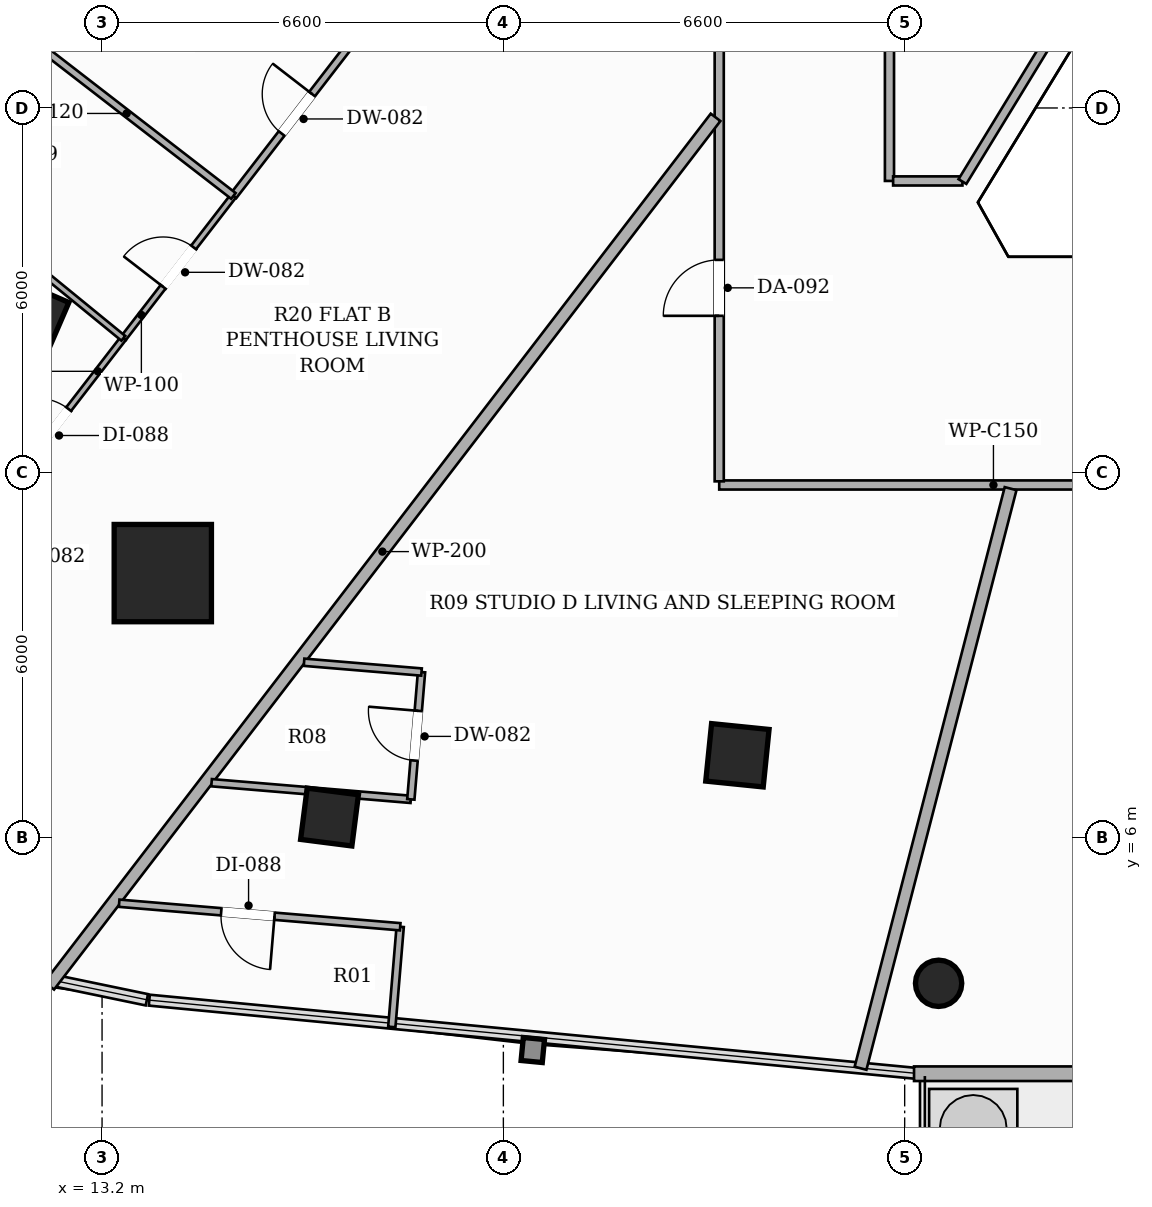
"""IFC4 building model, lengths in metres.
Left out: names, types, materials, properties, quantities, classifications, styles, units other than length and angle.
Written with IfcOpenShell. Run it as: python <this file> out.ifc"""

import sys

from ifc_helpers import new_model, si_unit, direction, frame, frame_2d, origin, origin_2d, place, context, subcontext, project, spatial, rectangle, hollow_rectangle, hollow_circle, extrude, element, fill, save


model = new_model("IFC4")
c1 = context("Model", 3, precision=1e-05, world=origin(), true_north=direction((0.0, 1.0)))
c2 = subcontext(c1, "Body", "Model", "MODEL_VIEW")
j1 = project(units=[si_unit("LENGTHUNIT", "METRE"), si_unit("PLANEANGLEUNIT", "RADIAN")], contexts=[c1])
p1 = place(None, origin())
s1 = spatial("IfcSite", under=j1, at=p1, CompositionType="ELEMENT")
p2 = place(p1, origin())
s2 = spatial("IfcBuilding", under=s1, at=p2, CompositionType="ELEMENT")
p3 = place(p2, frame((0.0, 0.0, 74.15)))
s3 = spatial("IfcBuildingStorey", under=s2, at=p3, CompositionType="ELEMENT", Elevation=74.15)
p4 = place(p3, frame((14.199, 10.351, 0.0), z_axis=(0.0, 0.0, 1.0), x_axis=(1.0, 0.0, 0.0)))
e1 = element("IfcColumn", 1, at=p4, inside=s3, PredefinedType="COLUMN", context=c2, shape_type="SweptSolid", body=[
    extrude(hollow_rectangle(XDim=1.6, YDim=1.6, WallThickness=0.05, at=origin_2d()), origin(), (0.0, 0.0, 1.0), 3.3),
])
p5 = place(p3, frame((23.649, 7.355, 0.0), z_axis=(0.0, 0.0, 1.0), x_axis=(-0.994880708829, 0.101056297183, 0.0)))
e2 = element("IfcColumn", 2, at=p5, inside=s3, PredefinedType="COLUMN", context=c2, shape_type="SweptSolid", body=[
    extrude(hollow_rectangle(XDim=0.95, YDim=0.95, WallThickness=0.032, at=origin_2d()), origin(), (0.0, 0.0, 1.0), 3.3),
])
for number, where, z_axis, x_axis in (
    (3, (12.095, 14.58, 0.0), (0.0, 0.0, 1.0), (0.397, 0.918, 0.0)),
    (4, (16.941, 6.339, 0.0), (0.0, 0.0, 1.0), (-0.992, 0.127, 0.0)),
):
    element("IfcColumn", number, at=place(p3, frame(where, z_axis=z_axis, x_axis=x_axis)), inside=s3, PredefinedType="COLUMN", context=c2, shape_type="SweptSolid", body=[
        extrude(hollow_rectangle(XDim=0.85, YDim=0.85, WallThickness=0.028, at=origin_2d()), origin(), (0.0, 0.0, 1.0), 3.3),
    ])
p6 = place(p3, frame((26.958, 3.605, 0.0), z_axis=(0.0, 0.0, 1.0), x_axis=(1.0, 0.0, 0.0)))
e5 = element("IfcColumn", 5, at=p6, inside=s3, PredefinedType="COLUMN", context=c2, shape_type="SweptSolid", body=[
    extrude(hollow_circle(Radius=0.381, WallThickness=0.022, at=origin_2d()), origin(), (0.0, 0.0, 1.0), 3.3),
])
p7 = place(p3, frame((26.554, 2.118, 0.0), z_axis=(0.0, 0.0, 1.0), x_axis=(1.0, 0.0, 0.0)))
e6 = element("IfcWall", 6, at=p7, inside=s3, PredefinedType="SOLIDWALL", context=c2, shape_type="SweptSolid", body=[
    extrude(rectangle(XDim=12.891, YDim=0.24, at=frame_2d((6.446, 0.0))), origin(), (0.0, 0.0, 1.0), 2.624),
])
p8 = place(p7, frame((10.393, 0.0, 0.0)))
e7 = element("IfcOpeningElement", 7, at=p8, cuts=e6, PredefinedType="OPENING", context=c2, shape_type="SweptSolid", body=[
    extrude(rectangle(XDim=1.8, YDim=2.2, at=frame_2d((0.9, 1.1))), frame((0.0, 0.13, 0.0), z_axis=(0.0, -1.0, 0.0), x_axis=(1.0, 0.0, 0.0)), (0.0, 0.0, 1.0), 0.26),
])
p9 = place(p3, frame((42.59, 11.8, 0.0), z_axis=(0.0, 0.0, 1.0), x_axis=(-1.0, 0.0, 0.0)))
e8 = element("IfcWall", 8, at=p9, inside=s3, PredefinedType="PARTITIONING", context=c2, shape_type="SweptSolid", body=[
    extrude(rectangle(XDim=19.24, YDim=0.15, at=frame_2d((9.62, 0.0))), origin(), (0.0, 0.0, 1.0), 2.669),
])
p10 = place(p9, frame((9.24, 0.0, 0.0)))
e9 = element("IfcOpeningElement", 9, at=p10, cuts=e8, PredefinedType="OPENING", context=c2, shape_type="SweptSolid", body=[
    extrude(rectangle(XDim=0.88, YDim=2.1, at=frame_2d((0.44, 1.05))), frame((0.0, 0.085, 0.0), z_axis=(0.0, -1.0, 0.0), x_axis=(1.0, 0.0, 0.0)), (0.0, 0.0, 1.0), 0.17),
])
p11 = place(p9, frame((2.174, 0.0, 0.0)))
e10 = element("IfcOpeningElement", 10, at=p11, cuts=e8, PredefinedType="OPENING", context=c2, shape_type="SweptSolid", body=[
    extrude(rectangle(XDim=0.88, YDim=2.1, at=frame_2d((0.44, 1.05))), frame((0.0, 0.085, 0.0), z_axis=(0.0, -1.0, 0.0), x_axis=(1.0, 0.0, 0.0)), (0.0, 0.0, 1.0), 0.17),
])
p12 = place(p3, frame((23.35, 11.86, 0.0), z_axis=(0.0, 0.0, 1.0), x_axis=(0.0, 1.0, 0.0)))
e11 = element("IfcWall", 11, at=p12, inside=s3, PredefinedType="PARTITIONING", context=c2, shape_type="SweptSolid", body=[
    extrude(rectangle(XDim=25.04, YDim=0.15, at=frame_2d((12.52, 0.0))), origin(), (0.0, 0.0, 1.0), 2.413),
])
p13 = place(p12, frame((18.695, 0.0, 0.0)))
e12 = element("IfcOpeningElement", 12, at=p13, cuts=e11, PredefinedType="OPENING", context=c2, shape_type="SweptSolid", body=[
    extrude(rectangle(XDim=0.88, YDim=2.1, at=frame_2d((0.44, 1.05))), frame((0.0, 0.085, 0.0), z_axis=(0.0, -1.0, 0.0), x_axis=(1.0, 0.0, 0.0)), (0.0, 0.0, 1.0), 0.17),
])
p14 = place(p12, frame((9.28, 0.0, 0.0)))
e13 = element("IfcOpeningElement", 13, at=p14, cuts=e11, PredefinedType="OPENING", context=c2, shape_type="SweptSolid", body=[
    extrude(rectangle(XDim=0.92, YDim=2.15, at=frame_2d((0.46, 1.075))), frame((0.0, 0.085, 0.0), z_axis=(0.0, -1.0, 0.0), x_axis=(1.0, 0.0, 0.0)), (0.0, 0.0, 1.0), 0.17),
])
p15 = place(p12, frame((2.722, 0.0, 0.0)))
e14 = element("IfcOpeningElement", 14, at=p15, cuts=e11, PredefinedType="OPENING", context=c2, shape_type="SweptSolid", body=[
    extrude(rectangle(XDim=0.92, YDim=2.15, at=frame_2d((0.46, 1.075))), frame((0.0, 0.085, 0.0), z_axis=(0.0, -1.0, 0.0), x_axis=(1.0, 0.0, 0.0)), (0.0, 0.0, 1.0), 0.17),
])
p16 = place(p3, frame((26.15, 23.79, 0.0), z_axis=(0.0, 0.0, 1.0), x_axis=(0.0, -1.0, 0.0)))
e15 = element("IfcWall", 15, at=p16, inside=s3, PredefinedType="PARTITIONING", context=c2, shape_type="SweptSolid", body=[
    extrude(rectangle(XDim=6.99, YDim=0.15, at=frame_2d((3.495, 0.0))), origin(), (0.0, 0.0, 1.0), 2.669),
])
p17 = place(p16, frame((3.943, 0.0, 0.0)))
e16 = element("IfcOpeningElement", 16, at=p17, cuts=e15, PredefinedType="OPENING", context=c2, shape_type="SweptSolid", body=[
    extrude(rectangle(XDim=0.88, YDim=2.1, at=frame_2d((0.44, 1.05))), frame((0.0, 0.085, 0.0), z_axis=(0.0, -1.0, 0.0), x_axis=(1.0, 0.0, 0.0)), (0.0, 0.0, 1.0), 0.17),
])
p18 = place(p3, frame((26.21, 16.8, 0.0), z_axis=(0.0, 0.0, 1.0), x_axis=(1.0, 0.0, 0.0)))
e17 = element("IfcWall", 17, at=p18, inside=s3, PredefinedType="PARTITIONING", context=c2, shape_type="SweptSolid", body=[
    extrude(rectangle(XDim=1.14, YDim=0.15, at=frame_2d((0.57, 0.0))), origin(), (0.0, 0.0, 1.0), 3.06),
])
p19 = place(p3, frame((27.35, 16.79, 0.0), z_axis=(0.0, 0.0, 1.0), x_axis=(0.521108010454, 0.853490738931, 0.0)))
e18 = element("IfcWall", 18, at=p19, inside=s3, PredefinedType="PARTITIONING", context=c2, shape_type="SweptSolid", body=[
    extrude(rectangle(XDim=8.202, YDim=0.15, at=frame_2d((4.101, 0.0))), origin(), (0.0, 0.0, 1.0), 2.669),
])
p20 = place(p3, frame((23.29, 25.387, 0.0), z_axis=(0.0, 0.0, 1.0), x_axis=(-0.884824599801, -0.465924272373, 0.0)))
e19 = element("IfcWall", 19, at=p20, inside=s3, PredefinedType="PARTITIONING", context=c2, shape_type="SweptSolid", body=[
    extrude(rectangle(XDim=14.88, YDim=0.2, at=frame_2d((7.44, 0.0))), origin(), (0.0, 0.0, 1.0), 2.413),
])
p21 = place(p3, frame((23.29, 17.846, 0.0), z_axis=(0.0, 0.0, 1.0), x_axis=(-0.608736412859, -0.793372535232, 0.0)))
e20 = element("IfcWall", 20, at=p21, inside=s3, PredefinedType="PARTITIONING", context=c2, shape_type="SweptSolid", body=[
    extrude(rectangle(XDim=18.003, YDim=0.2, at=frame_2d((9.001, 0.0))), origin(), (0.0, 0.0, 1.0), 2.413),
])
p22 = place(p3, frame((28.142, 11.74, 0.0), z_axis=(0.0, 0.0, 1.0), x_axis=(-0.250654087156, -0.968076716274, 0.0)))
e21 = element("IfcWall", 21, at=p22, inside=s3, PredefinedType="PARTITIONING", context=c2, shape_type="SweptSolid", body=[
    extrude(rectangle(XDim=9.846, YDim=0.2, at=frame_2d((4.923, 0.0))), origin(), (0.0, 0.0, 1.0), 2.413),
])
p23 = place(p3, frame((15.36, 16.554, 0.0), z_axis=(0.0, 0.0, 1.0), x_axis=(0.611289599194, 0.791406991324, 0.0)))
e22 = element("IfcWall", 22, at=p23, inside=s3, PredefinedType="PARTITIONING", context=c2, shape_type="SweptSolid", body=[
    extrude(rectangle(XDim=5.369, YDim=0.12, at=frame_2d((2.685, 0.0))), origin(), (0.0, 0.0, 1.0), 2.669),
])
p24 = place(p23, frame((1.297, 0.0, 0.0)))
e23 = element("IfcOpeningElement", 23, at=p24, cuts=e22, PredefinedType="OPENING", context=c2, shape_type="SweptSolid", body=[
    extrude(rectangle(XDim=0.82, YDim=2.1, at=frame_2d((0.41, 1.05))), frame((0.0, 0.07, 0.0), z_axis=(0.0, -1.0, 0.0), x_axis=(1.0, 0.0, 0.0)), (0.0, 0.0, 1.0), 0.14),
])
p25 = place(p3, frame((11.741, 11.87, 0.0), z_axis=(0.0, 0.0, 1.0), x_axis=(0.61134418085, 0.791364828976, 0.0)))
e24 = element("IfcWall", 24, at=p25, inside=s3, PredefinedType="PARTITIONING", context=c2, shape_type="SweptSolid", body=[
    extrude(rectangle(XDim=2.959, YDim=0.1, at=frame_2d((1.479, 0.0))), origin(), (0.0, 0.0, 1.0), 2.413),
])
p26 = place(p25, frame((0.608, 0.0, 0.0)))
e25 = element("IfcOpeningElement", 25, at=p26, cuts=e24, PredefinedType="OPENING", context=c2, shape_type="SweptSolid", body=[
    extrude(rectangle(XDim=0.88, YDim=2.1, at=frame_2d((0.44, 1.05))), frame((0.0, 0.06, 0.0), z_axis=(0.0, -1.0, 0.0), x_axis=(1.0, 0.0, 0.0)), (0.0, 0.0, 1.0), 0.12),
])
p27 = place(p3, frame((13.55, 14.212, 0.0), z_axis=(0.0, 0.0, 1.0), x_axis=(0.611510880037, 0.791236022686, 0.0)))
e26 = element("IfcWall", 26, at=p27, inside=s3, PredefinedType="PARTITIONING", context=c2, shape_type="SweptSolid", body=[
    extrude(rectangle(XDim=2.96, YDim=0.1, at=frame_2d((1.48, 0.0))), origin(), (0.0, 0.0, 1.0), 3.06),
])
p28 = place(p27, frame((1.07, 0.0, 0.0)))
e27 = element("IfcOpeningElement", 27, at=p28, cuts=e26, PredefinedType="OPENING", context=c2, shape_type="SweptSolid", body=[
    extrude(rectangle(XDim=0.82, YDim=2.1, at=frame_2d((0.41, 1.05))), frame((0.0, 0.06, 0.0), z_axis=(0.0, -1.0, 0.0), x_axis=(1.0, 0.0, 0.0)), (0.0, 0.0, 1.0), 0.12),
])
p29 = place(p3, frame((15.36, 16.554, 0.0), z_axis=(0.0, 0.0, 1.0), x_axis=(-0.79138059941, 0.611323766, 0.0)))
e28 = element("IfcWall", 28, at=p29, inside=s3, PredefinedType="PARTITIONING", context=c2, shape_type="SweptSolid", body=[
    extrude(rectangle(XDim=4.437, YDim=0.12, at=frame_2d((2.218, 0.0))), origin(), (0.0, 0.0, 1.0), 2.413),
])
p30 = place(p3, frame((9.654, 17.394, 0.0), z_axis=(0.0, 0.0, 1.0), x_axis=(0.774493289837, -0.63258212431, 0.0)))
e29 = element("IfcWall", 29, at=p30, inside=s3, PredefinedType="PARTITIONING", context=c2, shape_type="SweptSolid", body=[
    extrude(rectangle(XDim=5.03, YDim=0.1, at=frame_2d((2.515, 0.0))), origin(), (0.0, 0.0, 1.0), 2.413),
])
p31 = place(p3, frame((15.001, 6.904, 0.0), z_axis=(0.0, 0.0, 1.0), x_axis=(0.996518569178, -0.083371105803, 0.0)))
e30 = element("IfcWall", 30, at=p31, inside=s3, PredefinedType="PARTITIONING", context=c2, shape_type="SweptSolid", body=[
    extrude(rectangle(XDim=3.289, YDim=0.12, at=frame_2d((1.644, 0.0))), origin(), (0.0, 0.0, 1.0), 2.413),
])
p32 = place(p3, frame((18.278, 6.63, 0.0), z_axis=(0.0, 0.0, 1.0), x_axis=(0.083756885487, 0.996486218737, 0.0)))
e31 = element("IfcWall", 31, at=p32, inside=s3, PredefinedType="PARTITIONING", context=c2, shape_type="SweptSolid", body=[
    extrude(rectangle(XDim=2.102, YDim=0.12, at=frame_2d((1.051, 0.0))), origin(), (0.0, 0.0, 1.0), 2.413),
])
p33 = place(p32, frame((0.641, 0.0, 0.0)))
e32 = element("IfcOpeningElement", 32, at=p33, cuts=e31, PredefinedType="OPENING", context=c2, shape_type="SweptSolid", body=[
    extrude(rectangle(XDim=0.82, YDim=2.1, at=frame_2d((0.41, 1.05))), frame((0.0, 0.07, 0.0), z_axis=(0.0, -1.0, 0.0), x_axis=(1.0, 0.0, 0.0)), (0.0, 0.0, 1.0), 0.14),
])
p34 = place(p3, frame((18.454, 8.724, 0.0), z_axis=(0.0, 0.0, 1.0), x_axis=(-0.996550966871, 0.082982952637, 0.0)))
e33 = element("IfcWall", 33, at=p34, inside=s3, PredefinedType="PARTITIONING", context=c2, shape_type="SweptSolid", body=[
    extrude(rectangle(XDim=1.939, YDim=0.12, at=frame_2d((0.969, 0.0))), origin(), (0.0, 0.0, 1.0), 2.669),
])
p35 = place(p3, frame((17.965, 2.887, 0.0), z_axis=(0.0, 0.0, 1.0), x_axis=(0.083412008543, 0.996515146313, 0.0)))
e34 = element("IfcWall", 34, at=p35, inside=s3, PredefinedType="PARTITIONING", context=c2, shape_type="SweptSolid", body=[
    extrude(rectangle(XDim=1.654, YDim=0.12, at=frame_2d((0.827, 0.0))), origin(), (0.0, 0.0, 1.0), 2.619),
])
p36 = place(p3, frame((18.103, 4.535, 0.0), z_axis=(0.0, 0.0, 1.0), x_axis=(-0.99650936218, 0.083481082211, 0.0)))
e35 = element("IfcWall", 35, at=p36, inside=s3, PredefinedType="PARTITIONING", context=c2, shape_type="SweptSolid", body=[
    extrude(rectangle(XDim=4.638, YDim=0.12, at=frame_2d((2.319, 0.0))), origin(), (0.0, 0.0, 1.0), 2.619),
])
p37 = place(p36, frame((2.074, 0.0, 0.0)))
e36 = element("IfcOpeningElement", 36, at=p37, cuts=e35, PredefinedType="OPENING", context=c2, shape_type="SweptSolid", body=[
    extrude(rectangle(XDim=0.88, YDim=2.1, at=frame_2d((0.44, 1.05))), frame((0.0, 0.07, 0.0), z_axis=(0.0, -1.0, 0.0), x_axis=(1.0, 0.0, 0.0)), (0.0, 0.0, 1.0), 0.14),
])
p38 = place(p24, origin())
e37 = element("IfcDoor", 37, at=p38, inside=s3, OperationType="SINGLE_SWING_RIGHT", PredefinedType="DOOR", context=c2, shape_type="SweptSolid", body=[
    extrude(rectangle(XDim=0.82, YDim=2.1, at=frame_2d((0.41, 1.05))), frame((0.0, 0.025, 0.0), z_axis=(0.0, -1.0, 0.0), x_axis=(1.0, 0.0, 0.0)), (0.0, 0.0, 1.0), 0.05),
])
fill(e23, e37)
p39 = place(p26, origin())
e38 = element("IfcDoor", 38, at=p39, inside=s3, OperationType="SINGLE_SWING_LEFT", PredefinedType="DOOR", context=c2, shape_type="SweptSolid", body=[
    extrude(rectangle(XDim=0.88, YDim=2.1, at=frame_2d((0.44, 1.05))), frame((0.0, 0.025, 0.0), z_axis=(0.0, -1.0, 0.0), x_axis=(1.0, 0.0, 0.0)), (0.0, 0.0, 1.0), 0.05),
])
fill(e25, e38)
p40 = place(p28, origin())
e39 = element("IfcDoor", 39, at=p40, inside=s3, OperationType="SINGLE_SWING_LEFT", PredefinedType="DOOR", context=c2, shape_type="SweptSolid", body=[
    extrude(rectangle(XDim=0.82, YDim=2.1, at=frame_2d((0.41, 1.05))), frame((0.0, 0.025, 0.0), z_axis=(0.0, -1.0, 0.0), x_axis=(1.0, 0.0, 0.0)), (0.0, 0.0, 1.0), 0.05),
])
fill(e27, e39)
p41 = place(p15, origin())
e40 = element("IfcDoor", 40, at=p41, inside=s3, OperationType="SINGLE_SWING_LEFT", PredefinedType="DOOR", context=c2, shape_type="SweptSolid", body=[
    extrude(rectangle(XDim=0.92, YDim=2.15, at=frame_2d((0.46, 1.075))), frame((0.0, 0.025, 0.0), z_axis=(0.0, -1.0, 0.0), x_axis=(1.0, 0.0, 0.0)), (0.0, 0.0, 1.0), 0.05),
])
fill(e14, e40)
p42 = place(p33, origin())
e41 = element("IfcDoor", 41, at=p42, inside=s3, OperationType="SINGLE_SWING_RIGHT", PredefinedType="DOOR", context=c2, shape_type="SweptSolid", body=[
    extrude(rectangle(XDim=0.82, YDim=2.1, at=frame_2d((0.41, 1.05))), frame((0.0, 0.025, 0.0), z_axis=(0.0, -1.0, 0.0), x_axis=(1.0, 0.0, 0.0)), (0.0, 0.0, 1.0), 0.05),
])
fill(e32, e41)
p43 = place(p37, origin())
e42 = element("IfcDoor", 42, at=p43, inside=s3, OperationType="SINGLE_SWING_LEFT", PredefinedType="DOOR", context=c2, shape_type="SweptSolid", body=[
    extrude(rectangle(XDim=0.88, YDim=2.1, at=frame_2d((0.44, 1.05))), frame((0.0, 0.025, 0.0), z_axis=(0.0, -1.0, 0.0), x_axis=(1.0, 0.0, 0.0)), (0.0, 0.0, 1.0), 0.05),
])
fill(e36, e42)
save(model, sys.argv[1])
